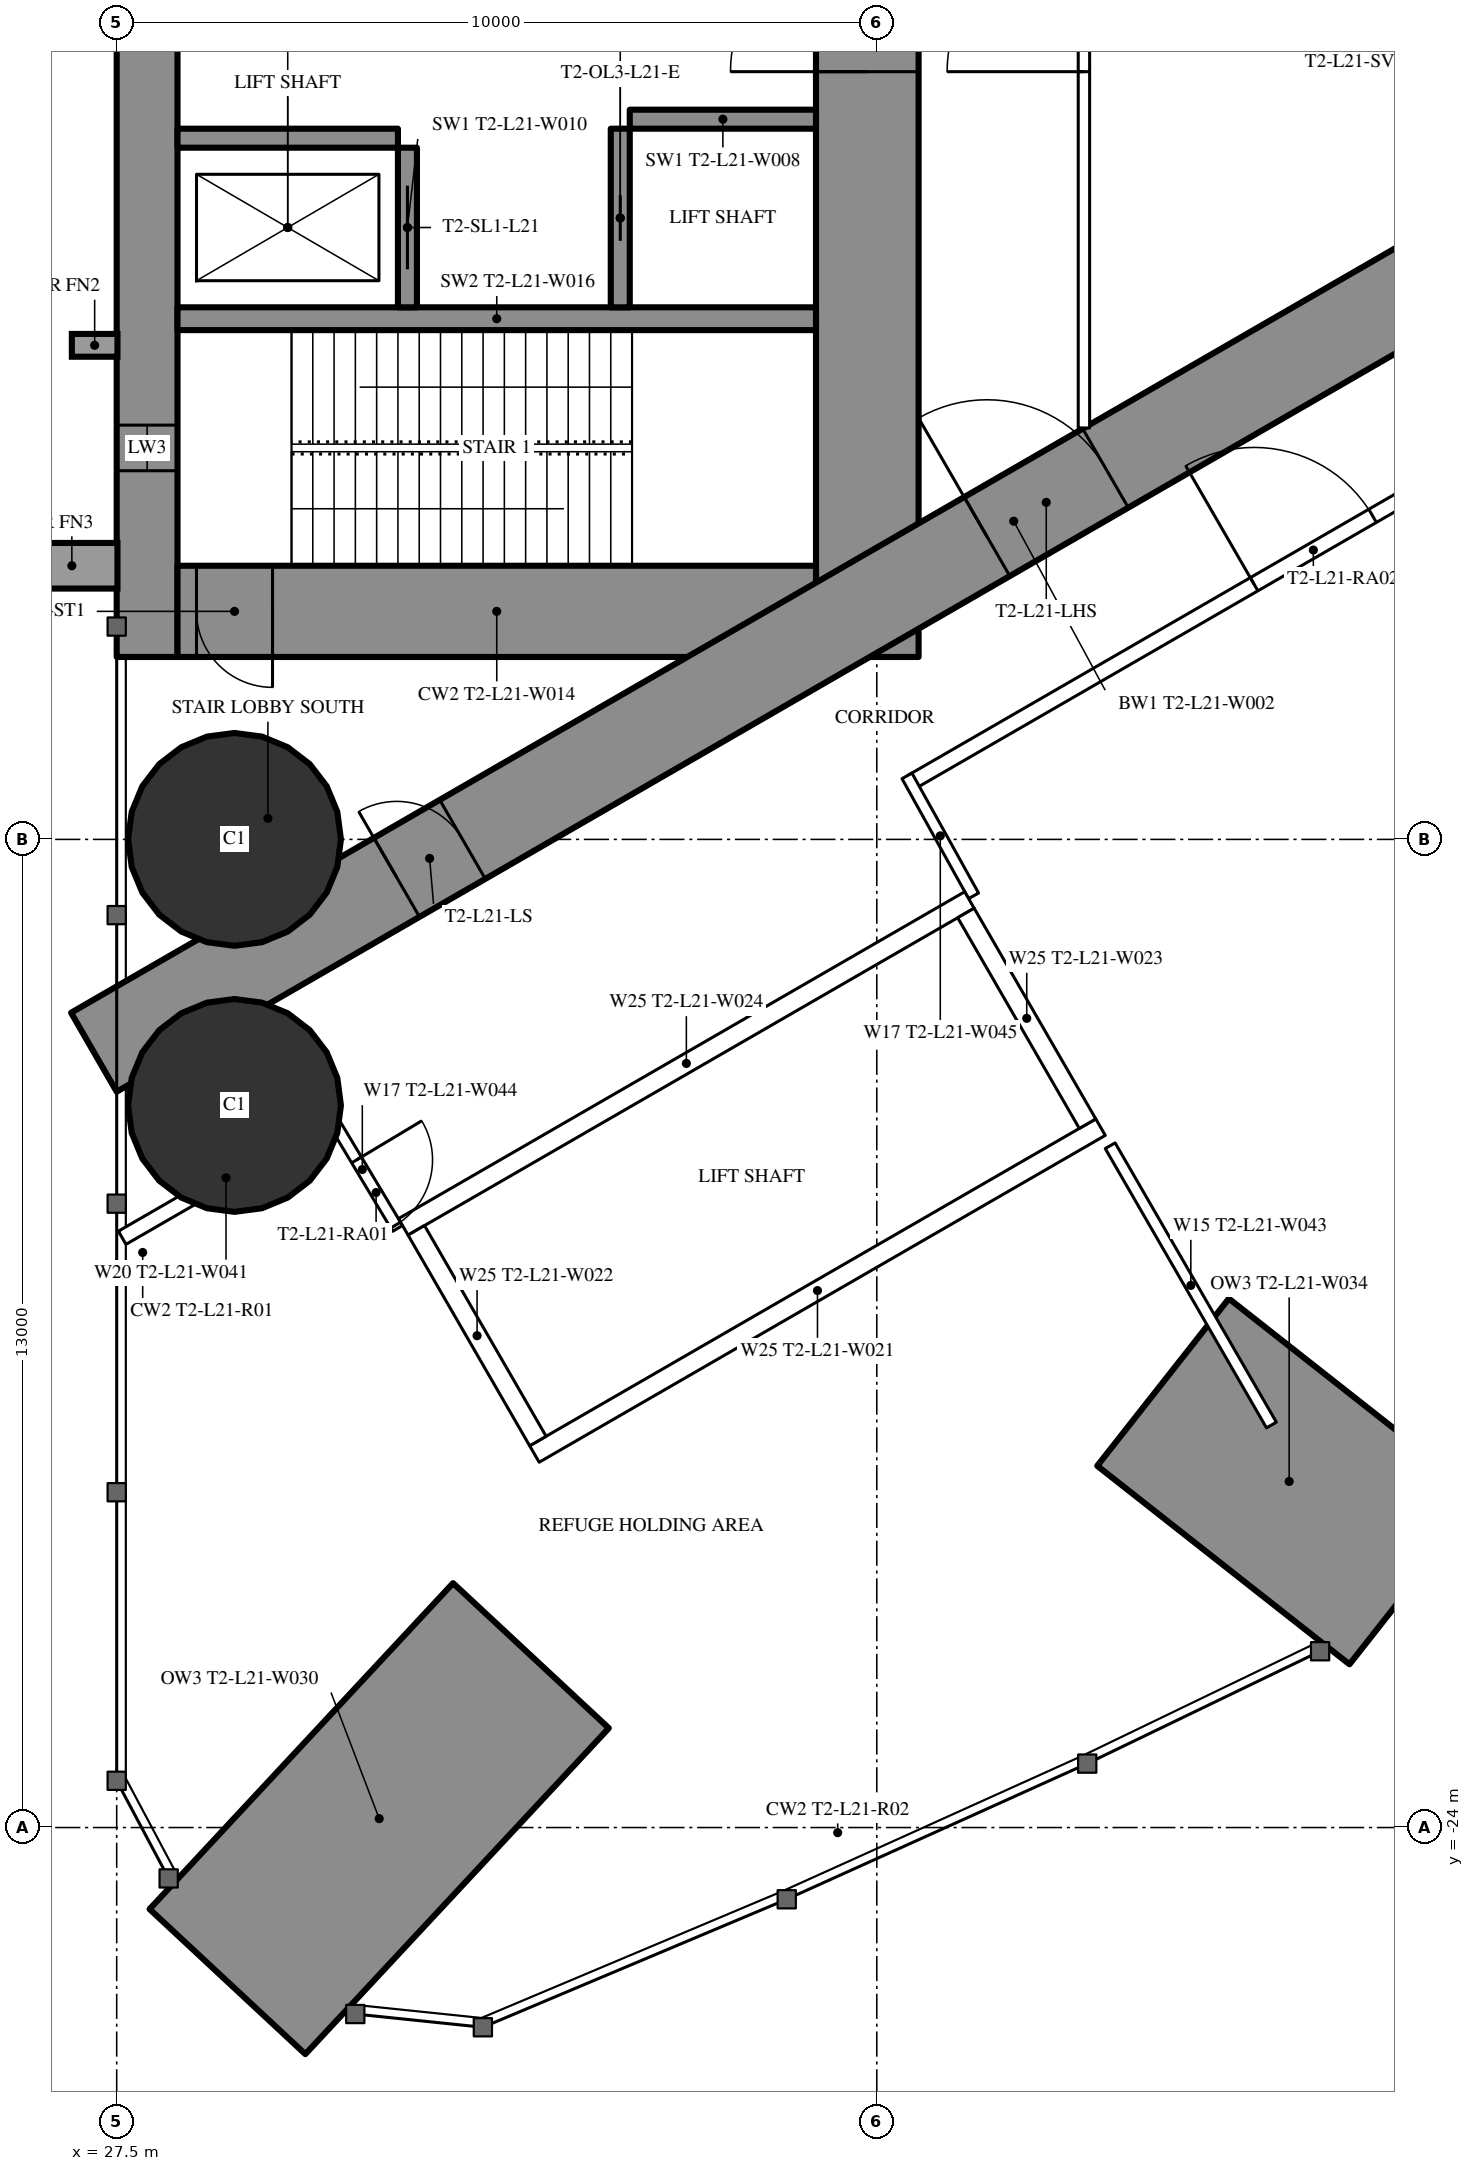
"""IFC4 building model, lengths in metres.
Left out: names, types, materials, properties, quantities, classifications, styles, units other than length and angle.
Written with IfcOpenShell. Run it as: python <this file> out.ifc"""

import sys

from ifc_helpers import new_model, si_unit, direction, frame, frame_2d, origin, origin_2d, place, context, subcontext, project, spatial, rectangle, hollow_circle, extrude, element, fill, save


model = new_model("IFC4")
c1 = context("Model", 3, precision=1e-05, world=origin(), true_north=direction((0.0, 1.0)))
c2 = subcontext(c1, "Body", "Model", "MODEL_VIEW")
j1 = project(units=[si_unit("LENGTHUNIT", "METRE"), si_unit("PLANEANGLEUNIT", "RADIAN")], contexts=[c1])
p1 = place(None, origin())
s1 = spatial("IfcSite", under=j1, at=p1, CompositionType="ELEMENT")
p2 = place(p1, origin())
s2 = spatial("IfcBuilding", under=s1, at=p2, CompositionType="ELEMENT")
p3 = place(p2, frame((0.0, 0.0, 81.0)))
s3 = spatial("IfcBuildingStorey", under=s2, at=p3, CompositionType="ELEMENT", Elevation=81.0)
p4 = place(p3, frame((28.957, -26.027, 0.0), z_axis=(0.0, 0.0, 1.0), x_axis=(0.681428532725, 0.731884659484, 0.0)))
e1 = element("IfcWall", 1, at=p4, inside=s3, PredefinedType="SHEAR", context=c2, shape_type="SweptSolid", body=[
    extrude(rectangle(XDim=5.86, YDim=2.8, at=frame_2d((2.93, 0.0))), origin(), (0.0, 0.0, 1.0), 6.0),
])
for number, where, z_axis, x_axis in (
    (2, (29.05, -11.0, 0.0), (0.0, 0.0, 1.0), (1.0, 0.0, 0.0)),
    (3, (29.05, -14.5, 0.0), (0.0, 0.0, 1.0), (1.0, 0.0, 0.0)),
):
    element("IfcColumn", number, at=place(p3, frame(where, z_axis=z_axis, x_axis=x_axis)), inside=s3, PredefinedType="COLUMN", context=c2, shape_type="SweptSolid", body=[
        extrude(hollow_circle(Radius=1.4, WallThickness=0.12, at=origin_2d()), origin(), (0.0, 0.0, 1.0), 6.0),
    ])
p5 = place(p3, frame((44.584, -20.752, 0.0), z_axis=(0.0, 0.0, 1.0), x_axis=(-0.785936955348, 0.618306640931, 0.0)))
e4 = element("IfcWall", 4, at=p5, inside=s3, PredefinedType="SHEAR", context=c2, shape_type="SweptSolid", body=[
    extrude(rectangle(XDim=4.222, YDim=2.8, at=frame_2d((2.111, 0.0))), origin(), (0.0, 0.0, 1.0), 6.0),
])
p6 = place(p3, frame((27.9, -8.6, 0.0), z_axis=(0.0, 0.0, 1.0), x_axis=(0.0, 1.0, 0.0)))
e5 = element("IfcWall", 5, at=p6, inside=s3, PredefinedType="SHEAR", context=c2, shape_type="SweptSolid", body=[
    extrude(rectangle(XDim=17.2, YDim=0.8, at=frame_2d((8.6, 0.0))), origin(), (0.0, 0.0, 1.0), 6.0),
])
p7 = place(p6, frame((2.45, 0.0, 0.6)))
e6 = element("IfcOpeningElement", 6, at=p7, cuts=e5, PredefinedType="OPENING", context=c2, shape_type="SweptSolid", body=[
    extrude(rectangle(XDim=0.6, YDim=4.5, at=frame_2d((0.3, 2.25))), frame((0.0, 0.41, 0.0), z_axis=(0.0, -1.0, 0.0), x_axis=(1.0, 0.0, 0.0)), (0.0, 0.0, 1.0), 0.82),
])
p8 = place(p6, frame((14.15, 0.0, 0.6)))
e7 = element("IfcOpeningElement", 7, at=p8, cuts=e5, PredefinedType="OPENING", context=c2, shape_type="SweptSolid", body=[
    extrude(rectangle(XDim=0.6, YDim=4.5, at=frame_2d((0.3, 2.25))), frame((0.0, 0.41, 0.0), z_axis=(0.0, -1.0, 0.0), x_axis=(1.0, 0.0, 0.0)), (0.0, 0.0, 1.0), 0.82),
])
p9 = place(p3, frame((37.375, -8.6, 0.0), z_axis=(0.0, 0.0, 1.0), x_axis=(0.0, 1.0, 0.0)))
e8 = element("IfcWall", 8, at=p9, inside=s3, PredefinedType="SHEAR", context=c2, shape_type="SweptSolid", body=[
    extrude(rectangle(XDim=17.2, YDim=1.35, at=frame_2d((8.6, 0.0))), origin(), (0.0, 0.0, 1.0), 6.0),
])
p10 = place(p9, frame((7.7, 0.0, 0.0)))
e9 = element("IfcOpeningElement", 9, at=p10, cuts=e8, PredefinedType="OPENING", context=c2, shape_type="SweptSolid", body=[
    extrude(rectangle(XDim=1.8, YDim=2.2, at=frame_2d((0.9, 1.1))), frame((0.0, 0.685, 0.0), z_axis=(0.0, -1.0, 0.0), x_axis=(1.0, 0.0, 0.0)), (0.0, 0.0, 1.0), 1.37),
])
p11 = place(p3, frame((28.3, -8.0, 0.0), z_axis=(0.0, 0.0, 1.0), x_axis=(1.0, 0.0, 0.0)))
e10 = element("IfcWall", 10, at=p11, inside=s3, PredefinedType="SHEAR", context=c2, shape_type="SweptSolid", body=[
    extrude(rectangle(XDim=8.4, YDim=1.2, at=frame_2d((4.2, 0.0))), origin(), (0.0, 0.0, 1.0), 6.0),
])
p12 = place(p11, frame((0.25, 0.0, 0.0)))
e11 = element("IfcOpeningElement", 11, at=p12, cuts=e10, PredefinedType="OPENING", context=c2, shape_type="SweptSolid", body=[
    extrude(rectangle(XDim=1.0, YDim=2.2, at=frame_2d((0.5, 1.1))), frame((0.0, 0.61, 0.0), z_axis=(0.0, -1.0, 0.0), x_axis=(1.0, 0.0, 0.0)), (0.0, 0.0, 1.0), 1.22),
])
p13 = place(p3, frame((28.3, -4.15, 0.0), z_axis=(0.0, 0.0, 1.0), x_axis=(1.0, 0.0, 0.0)))
e12 = element("IfcWall", 12, at=p13, inside=s3, PredefinedType="SHEAR", context=c2, shape_type="SweptSolid", body=[
    extrude(rectangle(XDim=8.4, YDim=0.3, at=frame_2d((4.2, 0.0))), origin(), (0.0, 0.0, 1.0), 6.0),
])
p14 = place(p3, frame((31.325, -4.0, 0.0), z_axis=(0.0, 0.0, 1.0), x_axis=(0.0, 1.0, 0.0)))
e13 = element("IfcWall", 13, at=p14, inside=s3, PredefinedType="SHEAR", context=c2, shape_type="SweptSolid", body=[
    extrude(rectangle(XDim=2.1, YDim=0.25, at=frame_2d((1.05, 0.0))), origin(), (0.0, 0.0, 1.0), 6.0),
])
p15 = place(p14, frame((0.5, 0.0, 0.0)))
e14 = element("IfcOpeningElement", 14, at=p15, cuts=e13, PredefinedType="OPENING", context=c2, shape_type="SweptSolid", body=[
    extrude(rectangle(XDim=1.1, YDim=2.2, at=frame_2d((0.55, 1.1))), frame((0.0, 0.135, 0.0), z_axis=(0.0, -1.0, 0.0), x_axis=(1.0, 0.0, 0.0)), (0.0, 0.0, 1.0), 0.27),
])
p16 = place(p3, frame((34.125, -4.0, 0.0), z_axis=(0.0, 0.0, 1.0), x_axis=(0.0, 1.0, 0.0)))
e15 = element("IfcWall", 15, at=p16, inside=s3, PredefinedType="SHEAR", context=c2, shape_type="SweptSolid", body=[
    extrude(rectangle(XDim=2.35, YDim=0.25, at=frame_2d((1.175, 0.0))), origin(), (0.0, 0.0, 1.0), 6.0),
])
p17 = place(p16, frame((0.875, 0.0, 0.0)))
e16 = element("IfcOpeningElement", 16, at=p17, cuts=e15, PredefinedType="OPENING", context=c2, shape_type="SweptSolid", body=[
    extrude(rectangle(XDim=0.6, YDim=2.0, at=frame_2d((0.3, 1.0))), frame((0.0, 0.135, 0.0), z_axis=(0.0, -1.0, 0.0), x_axis=(1.0, 0.0, 0.0)), (0.0, 0.0, 1.0), 0.27),
])
p18 = place(p3, frame((28.3, -1.775, 0.0), z_axis=(0.0, 0.0, 1.0), x_axis=(1.0, 0.0, 0.0)))
e17 = element("IfcWall", 17, at=p18, inside=s3, PredefinedType="SHEAR", context=c2, shape_type="SweptSolid", body=[
    extrude(rectangle(XDim=2.9, YDim=0.25, at=frame_2d((1.45, 0.0))), origin(), (0.0, 0.0, 1.0), 6.0),
])
p19 = place(p3, frame((34.25, -1.525, 0.0), z_axis=(0.0, 0.0, 1.0), x_axis=(1.0, 0.0, 0.0)))
e18 = element("IfcWall", 18, at=p19, inside=s3, PredefinedType="SHEAR", context=c2, shape_type="SweptSolid", body=[
    extrude(rectangle(XDim=2.45, YDim=0.25, at=frame_2d((1.225, 0.0))), origin(), (0.0, 0.0, 1.0), 6.0),
])
p20 = place(p3, frame((27.2, -13.8, 0.0), z_axis=(0.0, 0.0, 1.0), x_axis=(0.866027159892, 0.499996958321, 0.0)))
e19 = element("IfcWall", 19, at=p20, inside=s3, PredefinedType="SHEAR", context=c2, shape_type="SweptSolid", body=[
    extrude(rectangle(XDim=27.947, YDim=1.2, at=frame_2d((13.973, 0.0))), origin(), (0.0, 0.0, 1.0), 6.0),
])
p21 = place(p20, frame((4.6, 0.0, 0.0)))
e20 = element("IfcOpeningElement", 20, at=p21, cuts=e19, PredefinedType="OPENING", context=c2, shape_type="SweptSolid", body=[
    extrude(rectangle(XDim=1.0, YDim=2.2, at=frame_2d((0.5, 1.1))), frame((0.0, 0.61, 0.0), z_axis=(0.0, -1.0, 0.0), x_axis=(1.0, 0.0, 0.0)), (0.0, 0.0, 1.0), 1.22),
])
p22 = place(p20, frame((13.568, 0.0, 0.0)))
e21 = element("IfcOpeningElement", 21, at=p22, cuts=e19, PredefinedType="OPENING", context=c2, shape_type="SweptSolid", body=[
    extrude(rectangle(XDim=1.8, YDim=2.2, at=frame_2d((0.9, 1.1))), frame((0.0, 0.61, 0.0), z_axis=(0.0, -1.0, 0.0), x_axis=(1.0, 0.0, 0.0)), (0.0, 0.0, 1.0), 1.22),
])
p23 = place(p3, frame((40.57, -15.03, 0.0), z_axis=(0.0, 0.0, 1.0), x_axis=(0.500012993597, -0.866017901798, 0.0)))
e22 = element("IfcWall", 22, at=p23, inside=s3, PredefinedType="PARTITIONING", context=c2, shape_type="SweptSolid", body=[
    extrude(rectangle(XDim=4.243, YDim=0.15, at=frame_2d((2.122, 0.0))), origin(), (0.0, 0.0, 1.0), 5.75),
])
p24 = place(p3, frame((27.572, -16.241, 0.0), z_axis=(0.0, 0.0, 1.0), x_axis=(0.866029654818, 0.499992636921, 0.0)))
e23 = element("IfcWall", 23, at=p24, inside=s3, PredefinedType="PARTITIONING", context=c2, shape_type="SweptSolid", body=[
    extrude(rectangle(XDim=3.155, YDim=0.2, at=frame_2d((1.577, 0.0))), origin(), (0.0, 0.0, 1.0), 5.75),
])
p25 = place(p3, frame((37.96, -10.243, 0.0), z_axis=(0.0, 0.0, 1.0), x_axis=(0.866026429433, 0.499998223521, 0.0)))
e24 = element("IfcWall", 24, at=p25, inside=s3, PredefinedType="PARTITIONING", context=c2, shape_type="SweptSolid", body=[
    extrude(rectangle(XDim=20.487, YDim=0.2, at=frame_2d((10.243, 0.0))), origin(), (0.0, 0.0, 1.0), 5.75),
])
p26 = place(p25, frame((14.943, 0.0, 0.0)))
e25 = element("IfcOpeningElement", 25, at=p26, cuts=e24, PredefinedType="OPENING", context=c2, shape_type="SweptSolid", body=[
    extrude(rectangle(XDim=1.8, YDim=2.2, at=frame_2d((0.9, 1.1))), frame((0.0, 0.11, 0.0), z_axis=(0.0, -1.0, 0.0), x_axis=(1.0, 0.0, 0.0)), (0.0, 0.0, 1.0), 0.22),
])
p27 = place(p25, frame((5.2, 0.0, 0.0)))
e26 = element("IfcOpeningElement", 26, at=p27, cuts=e24, PredefinedType="OPENING", context=c2, shape_type="SweptSolid", body=[
    extrude(rectangle(XDim=1.8, YDim=2.2, at=frame_2d((0.9, 1.1))), frame((0.0, 0.11, 0.0), z_axis=(0.0, -1.0, 0.0), x_axis=(1.0, 0.0, 0.0)), (0.0, 0.0, 1.0), 0.22),
])
p28 = place(p3, frame((30.267, -14.569, 0.0), z_axis=(0.0, 0.0, 1.0), x_axis=(0.514336634837, -0.857588377991, 0.0)))
e27 = element("IfcWall", 27, at=p28, inside=s3, PredefinedType="PARTITIONING", context=c2, shape_type="SweptSolid", body=[
    extrude(rectangle(XDim=1.805, YDim=0.15, at=frame_2d((0.903, 0.0))), origin(), (0.0, 0.0, 1.0), 2.75),
])
p29 = place(p28, frame((0.755, 0.0, 0.0)))
e28 = element("IfcOpeningElement", 28, at=p29, cuts=e27, PredefinedType="OPENING", context=c2, shape_type="SweptSolid", body=[
    extrude(rectangle(XDim=1.0, YDim=2.2, at=frame_2d((0.5, 1.1))), frame((0.0, 0.085, 0.0), z_axis=(0.0, -1.0, 0.0), x_axis=(1.0, 0.0, 0.0)), (0.0, 0.0, 1.0), 0.17),
])
p30 = place(p3, frame((38.773, -11.742, 0.0), z_axis=(0.0, 0.0, 1.0), x_axis=(-0.485528096672, 0.8742210632, 0.0)))
e29 = element("IfcWall", 29, at=p30, inside=s3, PredefinedType="PARTITIONING", context=c2, shape_type="SweptSolid", body=[
    extrude(rectangle(XDim=1.805, YDim=0.15, at=frame_2d((0.903, 0.0))), origin(), (0.0, 0.0, 1.0), 5.75),
])
p31 = place(p3, frame((40.225, -5.587, 0.0), z_axis=(0.0, 0.0, 1.0), x_axis=(0.0, 1.0, 0.0)))
e30 = element("IfcWall", 30, at=p31, inside=s3, PredefinedType="PARTITIONING", context=c2, shape_type="SweptSolid", body=[
    extrude(rectangle(XDim=11.174, YDim=0.15, at=frame_2d((5.587, 0.0))), origin(), (0.0, 0.0, 1.0), 5.75),
])
p32 = place(p31, frame((4.687, 0.0, 0.0)))
e31 = element("IfcOpeningElement", 31, at=p32, cuts=e30, PredefinedType="OPENING", context=c2, shape_type="SweptSolid", body=[
    extrude(rectangle(XDim=1.8, YDim=2.2, at=frame_2d((0.9, 1.1))), frame((0.0, 0.085, 0.0), z_axis=(0.0, -1.0, 0.0), x_axis=(1.0, 0.0, 0.0)), (0.0, 0.0, 1.0), 0.17),
])
for number, where, z_axis, x_axis in (
    (32, (31.271, -16.097, 0.0), (0.0, 0.0, 1.0), (0.866, 0.5, 0.0)),
    (33, (32.996, -19.086, 0.0), (0.0, 0.0, 1.0), (0.866, 0.5, 0.0)),
):
    element("IfcWall", number, at=place(p3, frame(where, z_axis=z_axis, x_axis=x_axis)), inside=s3, PredefinedType="PARTITIONING", context=c2, shape_type="SweptSolid", body=[
        extrude(rectangle(XDim=8.6, YDim=0.25, at=frame_2d((4.3, 0.0))), origin(), (0.0, 0.0, 1.0), 5.75),
    ])
for number, where, z_axis, x_axis in (
    (34, (31.441, -16.143, 0.0), (0.0, 0.0, 1.0), (0.5, -0.866, 0.0)),
    (35, (38.673, -11.968, 0.0), (0.0, 0.0, 1.0), (0.5, -0.866, 0.0)),
):
    element("IfcWall", number, at=place(p3, frame(where, z_axis=z_axis, x_axis=x_axis)), inside=s3, PredefinedType="PARTITIONING", context=c2, shape_type="SweptSolid", body=[
        extrude(rectangle(XDim=3.201, YDim=0.25, at=frame_2d((1.6, 0.0))), origin(), (0.0, 0.0, 1.0), 5.75),
    ])
p33 = place(p29, origin())
e36 = element("IfcDoor", 36, at=p33, inside=s3, OperationType="SINGLE_SWING_LEFT", PredefinedType="DOOR", context=c2, shape_type="SweptSolid", body=[
    extrude(rectangle(XDim=1.0, YDim=2.2, at=frame_2d((0.5, 1.1))), frame((0.0, 0.025, 0.0), z_axis=(0.0, -1.0, 0.0), x_axis=(1.0, 0.0, 0.0)), (0.0, 0.0, 1.0), 0.05),
])
fill(e28, e36)
p34 = place(p27, origin())
e37 = element("IfcDoor", 37, at=p34, inside=s3, OperationType="DOUBLE_DOOR_SINGLE_SWING", PredefinedType="DOOR", context=c2, shape_type="SweptSolid", body=[
    extrude(rectangle(XDim=1.8, YDim=2.2, at=frame_2d((0.9, 1.1))), frame((0.0, 0.025, 0.0), z_axis=(0.0, -1.0, 0.0), x_axis=(1.0, 0.0, 0.0)), (0.0, 0.0, 1.0), 0.05),
])
fill(e26, e37)
p35 = place(p32, origin())
e38 = element("IfcDoor", 38, at=p35, inside=s3, OperationType="DOUBLE_DOOR_SINGLE_SWING", PredefinedType="DOOR", context=c2, shape_type="SweptSolid", body=[
    extrude(rectangle(XDim=1.8, YDim=2.2, at=frame_2d((0.9, 1.1))), frame((0.0, 0.025, 0.0), z_axis=(0.0, -1.0, 0.0), x_axis=(1.0, 0.0, 0.0)), (0.0, 0.0, 1.0), 0.05),
])
fill(e31, e38)
p36 = place(p21, origin())
e39 = element("IfcDoor", 39, at=p36, inside=s3, OperationType="SINGLE_SWING_LEFT", PredefinedType="DOOR", context=c2, shape_type="SweptSolid", body=[
    extrude(rectangle(XDim=1.0, YDim=2.2, at=frame_2d((0.5, 1.1))), frame((0.0, 0.025, 0.0), z_axis=(0.0, -1.0, 0.0), x_axis=(1.0, 0.0, 0.0)), (0.0, 0.0, 1.0), 0.05),
])
fill(e20, e39)
p37 = place(p22, origin())
e40 = element("IfcDoor", 40, at=p37, inside=s3, OperationType="DOUBLE_DOOR_SINGLE_SWING", PredefinedType="DOOR", context=c2, shape_type="SweptSolid", body=[
    extrude(rectangle(XDim=1.8, YDim=2.2, at=frame_2d((0.9, 1.1))), frame((0.0, 0.025, 0.0), z_axis=(0.0, -1.0, 0.0), x_axis=(1.0, 0.0, 0.0)), (0.0, 0.0, 1.0), 0.05),
])
fill(e21, e40)
p38 = place(p10, origin())
e41 = element("IfcDoor", 41, at=p38, inside=s3, OperationType="DOUBLE_DOOR_SINGLE_SWING", PredefinedType="DOOR", context=c2, shape_type="SweptSolid", body=[
    extrude(rectangle(XDim=1.8, YDim=2.2, at=frame_2d((0.9, 1.1))), frame((0.0, 0.025, 0.0), z_axis=(0.0, -1.0, 0.0), x_axis=(1.0, 0.0, 0.0)), (0.0, 0.0, 1.0), 0.05),
])
fill(e9, e41)
p39 = place(p12, origin())
e42 = element("IfcDoor", 42, at=p39, inside=s3, OperationType="SINGLE_SWING_RIGHT", PredefinedType="DOOR", context=c2, shape_type="SweptSolid", body=[
    extrude(rectangle(XDim=1.0, YDim=2.2, at=frame_2d((0.5, 1.1))), frame((0.0, 0.025, 0.0), z_axis=(0.0, -1.0, 0.0), x_axis=(1.0, 0.0, 0.0)), (0.0, 0.0, 1.0), 0.05),
])
fill(e11, e42)
p40 = place(p15, origin())
e43 = element("IfcDoor", 43, at=p40, inside=s3, OperationType="SLIDING_TO_LEFT", PredefinedType="USERDEFINED", context=c2, shape_type="SweptSolid", body=[
    extrude(rectangle(XDim=1.1, YDim=2.2, at=frame_2d((0.55, 1.1))), frame((0.0, 0.025, 0.0), z_axis=(0.0, -1.0, 0.0), x_axis=(1.0, 0.0, 0.0)), (0.0, 0.0, 1.0), 0.05),
])
fill(e14, e43)
p41 = place(p17, origin())
e44 = element("IfcDoor", 44, at=p41, inside=s3, OperationType="SLIDING_TO_LEFT", PredefinedType="DOOR", context=c2, shape_type="SweptSolid", body=[
    extrude(rectangle(XDim=0.6, YDim=2.0, at=frame_2d((0.3, 1.0))), frame((0.0, 0.025, 0.0), z_axis=(0.0, -1.0, 0.0), x_axis=(1.0, 0.0, 0.0)), (0.0, 0.0, 1.0), 0.05),
])
fill(e16, e44)
p42 = place(p7, origin())
e45 = element("IfcWindow", 45, at=p42, inside=s3, PartitioningType="SINGLE_PANEL", PredefinedType="WINDOW", context=c2, shape_type="SweptSolid", body=[
    extrude(rectangle(XDim=0.6, YDim=4.5, at=frame_2d((0.3, 2.25))), frame((0.0, 0.03, 0.0), z_axis=(0.0, -1.0, 0.0), x_axis=(1.0, 0.0, 0.0)), (0.0, 0.0, 1.0), 0.06),
])
fill(e6, e45)
save(model, sys.argv[1])
